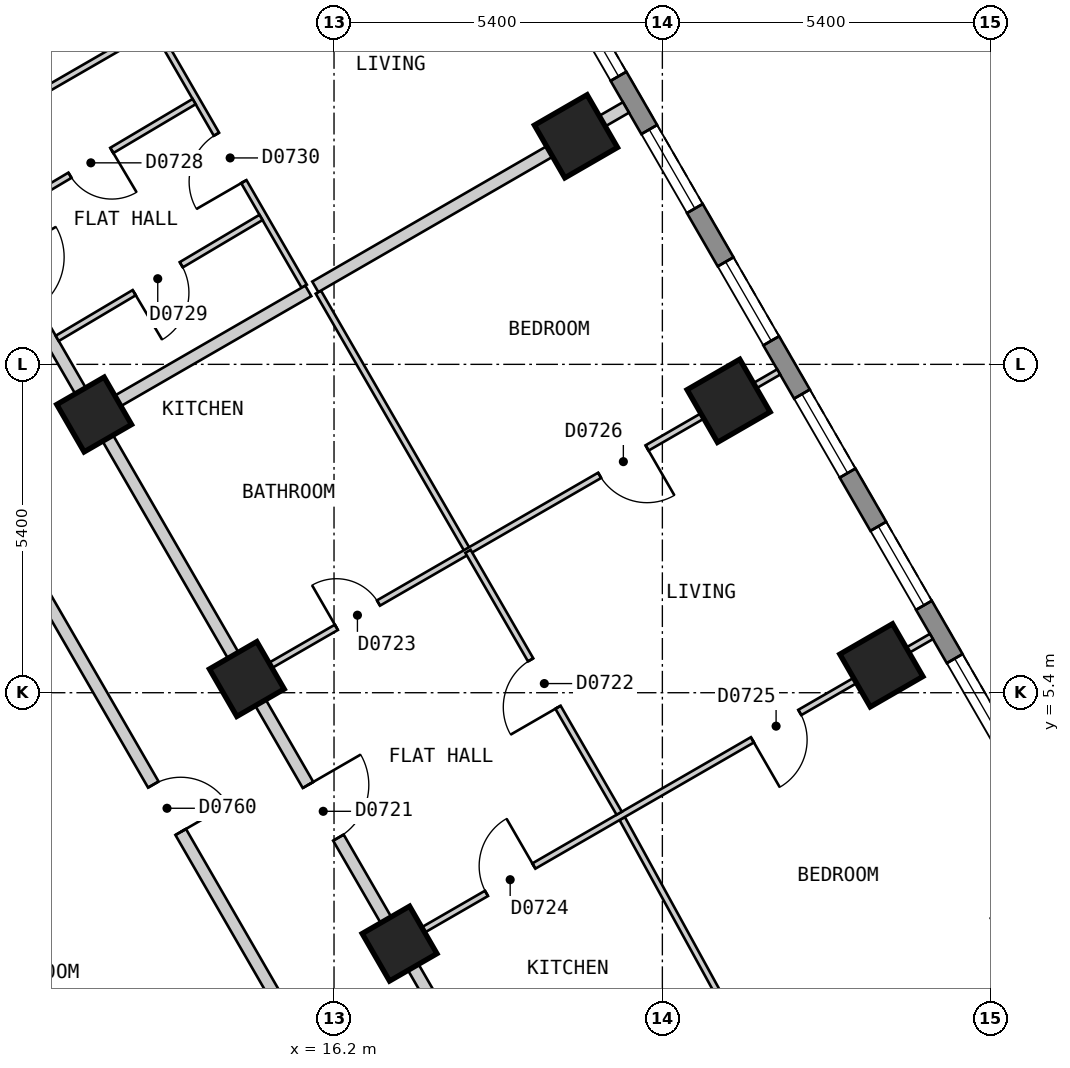
"""IFC4 building model, lengths in metres.
Left out: names, types, materials, properties, quantities, classifications, styles, units other than length and angle.
Written with IfcOpenShell. Run it as: python <this file> out.ifc"""

import sys

from ifc_helpers import new_model, si_unit, direction, frame, frame_2d, origin, origin_2d, place, context, subcontext, project, spatial, polyline, rectangle, outline, extrude, element, fill, save


model = new_model("IFC4")
c1 = context("Model", 3, precision=1e-05, world=origin(), true_north=direction((0.0, 1.0)))
c2 = subcontext(c1, "Body", "Model", "MODEL_VIEW")
j1 = project(units=[si_unit("LENGTHUNIT", "METRE"), si_unit("PLANEANGLEUNIT", "RADIAN")], contexts=[c1])
p1 = place(None, origin())
s1 = spatial("IfcSite", under=j1, at=p1, CompositionType="ELEMENT")
p2 = place(p1, origin())
s2 = spatial("IfcBuilding", under=s1, at=p2, CompositionType="ELEMENT")
p3 = place(p2, frame((0.0, 0.0, 99.0)))
s3 = spatial("IfcBuildingStorey", under=s2, at=p3, CompositionType="ELEMENT", Elevation=99.0)
for number, where, z_axis, x_axis in (
    (1, (25.202, 5.85, 0.0), (0.0, 0.0, 1.0), (-0.5, 0.866, 0.0)),
    (2, (22.69, 10.2, 0.0), (0.0, 0.0, 1.0), (-0.5, 0.866, 0.0)),
    (3, (20.179, 14.55, 0.0), (0.0, 0.0, 1.0), (-0.5, 0.866, 0.0)),
):
    element("IfcColumn", number, at=place(p3, frame(where, z_axis=z_axis, x_axis=x_axis)), inside=s3, PredefinedType="COLUMN", context=c2, shape_type="SweptSolid", body=[
        extrude(rectangle(XDim=1.0, YDim=1.0, at=origin_2d()), origin(), (0.0, 0.0, 1.0), 3.0),
    ])
for number, where, z_axis, x_axis in (
    (4, (17.278, 1.274, 0.0), (0.0, 0.0, 1.0), (-0.5, 0.866, 0.0)),
    (5, (14.766, 5.625, 0.0), (0.0, 0.0, 1.0), (-0.5, 0.866, 0.0)),
    (6, (12.255, 9.975, 0.0), (0.0, 0.0, 1.0), (-0.5, 0.866, 0.0)),
):
    element("IfcColumn", number, at=place(p3, frame(where, z_axis=z_axis, x_axis=x_axis)), inside=s3, PredefinedType="COLUMN", context=c2, shape_type="SweptSolid", body=[
        extrude(rectangle(XDim=0.9, YDim=0.9, at=origin_2d()), origin(), (0.0, 0.0, 1.0), 3.0),
    ])
p4 = place(p3, frame((29.027, 1.425, 0.0), z_axis=(0.0, 0.0, 1.0), x_axis=(-0.500027479704, 0.866009537788, 0.0)))
e7 = element("IfcWall", 7, at=p4, inside=s3, PredefinedType="SOLIDWALL", context=c2, shape_type="SweptSolid", body=[
    extrude(outline(polyline([(0.0, -0.15), (26.559, -0.15), (26.478, 0.15), (0.08, 0.15), (0.0, -0.15)])), origin(), (0.0, 0.0, 1.0), 2.7),
])
p5 = place(p4, frame((1.227, 0.0, 0.15)))
e8 = element("IfcOpeningElement", 8, at=p5, cuts=e7, PredefinedType="OPENING", context=c2, shape_type="SweptSolid", body=[
    extrude(rectangle(XDim=1.5, YDim=2.1, at=frame_2d((0.75, 1.05))), frame((0.0, 0.16, 0.0), z_axis=(0.0, -1.0, 0.0), x_axis=(1.0, 0.0, 0.0)), (0.0, 0.0, 1.0), 0.32),
])
p6 = place(p4, frame((3.738, 0.0, 0.15)))
e9 = element("IfcOpeningElement", 9, at=p6, cuts=e7, PredefinedType="OPENING", context=c2, shape_type="SweptSolid", body=[
    extrude(rectangle(XDim=1.5, YDim=2.1, at=frame_2d((0.75, 1.05))), frame((0.0, 0.16, 0.0), z_axis=(0.0, -1.0, 0.0), x_axis=(1.0, 0.0, 0.0)), (0.0, 0.0, 1.0), 0.32),
])
p7 = place(p4, frame((6.25, 0.0, 0.15)))
e10 = element("IfcOpeningElement", 10, at=p7, cuts=e7, PredefinedType="OPENING", context=c2, shape_type="SweptSolid", body=[
    extrude(rectangle(XDim=1.5, YDim=2.1, at=frame_2d((0.75, 1.05))), frame((0.0, 0.16, 0.0), z_axis=(0.0, -1.0, 0.0), x_axis=(1.0, 0.0, 0.0)), (0.0, 0.0, 1.0), 0.32),
])
p8 = place(p4, frame((8.761, 0.0, 0.15)))
e11 = element("IfcOpeningElement", 11, at=p8, cuts=e7, PredefinedType="OPENING", context=c2, shape_type="SweptSolid", body=[
    extrude(rectangle(XDim=1.5, YDim=2.1, at=frame_2d((0.75, 1.05))), frame((0.0, 0.16, 0.0), z_axis=(0.0, -1.0, 0.0), x_axis=(1.0, 0.0, 0.0)), (0.0, 0.0, 1.0), 0.32),
])
p9 = place(p4, frame((11.273, 0.0, 0.15)))
e12 = element("IfcOpeningElement", 12, at=p9, cuts=e7, PredefinedType="OPENING", context=c2, shape_type="SweptSolid", body=[
    extrude(rectangle(XDim=1.5, YDim=2.1, at=frame_2d((0.75, 1.05))), frame((0.0, 0.16, 0.0), z_axis=(0.0, -1.0, 0.0), x_axis=(1.0, 0.0, 0.0)), (0.0, 0.0, 1.0), 0.32),
])
p10 = place(p4, frame((13.785, 0.0, 0.15)))
e13 = element("IfcOpeningElement", 13, at=p10, cuts=e7, PredefinedType="OPENING", context=c2, shape_type="SweptSolid", body=[
    extrude(rectangle(XDim=1.5, YDim=2.1, at=frame_2d((0.75, 1.05))), frame((0.0, 0.16, 0.0), z_axis=(0.0, -1.0, 0.0), x_axis=(1.0, 0.0, 0.0)), (0.0, 0.0, 1.0), 0.32),
])
p11 = place(p4, frame((16.296, 0.0, 0.15)))
e14 = element("IfcOpeningElement", 14, at=p11, cuts=e7, PredefinedType="OPENING", context=c2, shape_type="SweptSolid", body=[
    extrude(rectangle(XDim=1.5, YDim=2.1, at=frame_2d((0.75, 1.05))), frame((0.0, 0.16, 0.0), z_axis=(0.0, -1.0, 0.0), x_axis=(1.0, 0.0, 0.0)), (0.0, 0.0, 1.0), 0.32),
])
p12 = place(p4, frame((18.807, 0.0, 0.15)))
e15 = element("IfcOpeningElement", 15, at=p12, cuts=e7, PredefinedType="OPENING", context=c2, shape_type="SweptSolid", body=[
    extrude(rectangle(XDim=1.5, YDim=2.1, at=frame_2d((0.75, 1.05))), frame((0.0, 0.16, 0.0), z_axis=(0.0, -1.0, 0.0), x_axis=(1.0, 0.0, 0.0)), (0.0, 0.0, 1.0), 0.32),
])
p13 = place(p4, frame((21.319, 0.0, 0.15)))
e16 = element("IfcOpeningElement", 16, at=p13, cuts=e7, PredefinedType="OPENING", context=c2, shape_type="SweptSolid", body=[
    extrude(rectangle(XDim=1.5, YDim=2.1, at=frame_2d((0.75, 1.05))), frame((0.0, 0.16, 0.0), z_axis=(0.0, -1.0, 0.0), x_axis=(1.0, 0.0, 0.0)), (0.0, 0.0, 1.0), 0.32),
])
p14 = place(p4, frame((23.831, 0.0, 0.15)))
e17 = element("IfcOpeningElement", 17, at=p14, cuts=e7, PredefinedType="OPENING", context=c2, shape_type="SweptSolid", body=[
    extrude(rectangle(XDim=1.5, YDim=2.1, at=frame_2d((0.75, 1.05))), frame((0.0, 0.16, 0.0), z_axis=(0.0, -1.0, 0.0), x_axis=(1.0, 0.0, 0.0)), (0.0, 0.0, 1.0), 0.32),
])
p15 = place(p3, frame((10.913, 7.899, 0.0), z_axis=(0.0, 0.0, 1.0), x_axis=(0.500028940566, -0.866008694296, 0.0)))
e18 = element("IfcWall", 18, at=p15, inside=s3, PredefinedType="PARTITIONING", context=c2, shape_type="SweptSolid", body=[
    extrude(rectangle(XDim=10.159, YDim=0.2, at=frame_2d((5.08, 0.0))), origin(), (0.0, 0.0, 1.0), 2.7),
])
p16 = place(p15, frame((4.63, 0.0, 0.0)))
e19 = element("IfcOpeningElement", 19, at=p16, cuts=e18, PredefinedType="OPENING", context=c2, shape_type="SweptSolid", body=[
    extrude(rectangle(XDim=0.9, YDim=2.1, at=frame_2d((0.45, 1.05))), frame((0.0, 0.11, 0.0), z_axis=(0.0, -1.0, 0.0), x_axis=(1.0, 0.0, 0.0)), (0.0, 0.0, 1.0), 0.22),
])
p17 = place(p3, frame((8.488, 16.5, 0.0), z_axis=(0.0, 0.0, 1.0), x_axis=(0.499986836607, -0.86603300354, 0.0)))
e20 = element("IfcWall", 20, at=p17, inside=s3, PredefinedType="PARTITIONING", context=c2, shape_type="SweptSolid", body=[
    extrude(rectangle(XDim=20.09, YDim=0.2, at=frame_2d((10.045, 0.0))), origin(), (0.0, 0.0, 1.0), 2.7),
])
p18 = place(p17, frame((14.569, 0.0, 0.0)))
e21 = element("IfcOpeningElement", 21, at=p18, cuts=e20, PredefinedType="OPENING", context=c2, shape_type="SweptSolid", body=[
    extrude(rectangle(XDim=1.0, YDim=2.1, at=frame_2d((0.5, 1.05))), frame((0.0, 0.11, 0.0), z_axis=(0.0, -1.0, 0.0), x_axis=(1.0, 0.0, 0.0)), (0.0, 0.0, 1.0), 0.22),
])
p19 = place(p17, frame((4.547, 0.0, 0.0)))
e22 = element("IfcOpeningElement", 22, at=p19, cuts=e20, PredefinedType="OPENING", context=c2, shape_type="SweptSolid", body=[
    extrude(rectangle(XDim=1.0, YDim=2.1, at=frame_2d((0.5, 1.05))), frame((0.0, 0.11, 0.0), z_axis=(0.0, -1.0, 0.0), x_axis=(1.0, 0.0, 0.0)), (0.0, 0.0, 1.0), 0.22),
])
p20 = place(p3, frame((13.273, 16.305, 0.0), z_axis=(0.0, 0.0, 1.0), x_axis=(0.500093956194, -0.865971151354, 0.0)))
e23 = element("IfcWall", 23, at=p20, inside=s3, PredefinedType="PARTITIONING", context=c2, shape_type="SweptSolid", body=[
    extrude(rectangle(XDim=4.873, YDim=0.1, at=frame_2d((2.437, 0.0))), origin(), (0.0, 0.0, 1.0), 2.7),
])
p21 = place(p20, frame((1.987, 0.0, 0.0)))
e24 = element("IfcOpeningElement", 24, at=p21, cuts=e23, PredefinedType="OPENING", context=c2, shape_type="SweptSolid", body=[
    extrude(rectangle(XDim=0.9, YDim=2.1, at=frame_2d((0.45, 1.05))), frame((0.0, 0.06, 0.0), z_axis=(0.0, -1.0, 0.0), x_axis=(1.0, 0.0, 0.0)), (0.0, 0.0, 1.0), 0.12),
])
p22 = place(p3, frame((15.942, 11.988, 0.0), z_axis=(0.0, 0.0, 1.0), x_axis=(0.499995794706, -0.866027831699, 0.0)))
e25 = element("IfcWall", 25, at=p22, inside=s3, PredefinedType="PARTITIONING", context=c2, shape_type="SweptSolid", body=[
    extrude(rectangle(XDim=4.922, YDim=0.1, at=frame_2d((2.461, 0.0))), origin(), (0.0, 0.0, 1.0), 2.7),
])
p23 = place(p3, frame((20.939, 3.331, 0.0), z_axis=(0.0, 0.0, 1.0), x_axis=(0.481207738216, -0.876606589458, 0.0)))
e26 = element("IfcWall", 26, at=p23, inside=s3, PredefinedType="PARTITIONING", context=c2, shape_type="SweptSolid", body=[
    extrude(rectangle(XDim=4.825, YDim=0.1, at=frame_2d((2.413, 0.0))), origin(), (0.0, 0.0, 1.0), 2.7),
])
p24 = place(p3, frame((17.365, 1.325, 0.0), z_axis=(0.0, 0.0, 1.0), x_axis=(0.866016855193, 0.500014806302, 0.0)))
e27 = element("IfcWall", 27, at=p24, inside=s3, PredefinedType="PARTITIONING", context=c2, shape_type="SweptSolid", body=[
    extrude(rectangle(XDim=10.0, YDim=0.1, at=frame_2d((5.0, 0.0))), origin(), (0.0, 0.0, 1.0), 2.7),
])
p25 = place(p24, frame((1.55, 0.0, 0.0)))
e28 = element("IfcOpeningElement", 28, at=p25, cuts=e27, PredefinedType="OPENING", context=c2, shape_type="SweptSolid", body=[
    extrude(rectangle(XDim=0.9, YDim=2.1, at=frame_2d((0.45, 1.05))), frame((0.0, 0.06, 0.0), z_axis=(0.0, -1.0, 0.0), x_axis=(1.0, 0.0, 0.0)), (0.0, 0.0, 1.0), 0.12),
])
p26 = place(p24, frame((6.6, 0.0, 0.0)))
e29 = element("IfcOpeningElement", 29, at=p26, cuts=e27, PredefinedType="OPENING", context=c2, shape_type="SweptSolid", body=[
    extrude(rectangle(XDim=0.9, YDim=2.1, at=frame_2d((0.45, 1.05))), frame((0.0, 0.06, 0.0), z_axis=(0.0, -1.0, 0.0), x_axis=(1.0, 0.0, 0.0)), (0.0, 0.0, 1.0), 0.12),
])
p27 = place(p3, frame((14.853, 5.675, 0.0), z_axis=(0.0, 0.0, 1.0), x_axis=(0.866016855193, 0.500014806302, 0.0)))
e30 = element("IfcWall", 30, at=p27, inside=s3, PredefinedType="PARTITIONING", context=c2, shape_type="SweptSolid", body=[
    extrude(rectangle(XDim=10.0, YDim=0.1, at=frame_2d((5.0, 0.0))), origin(), (0.0, 0.0, 1.0), 2.7),
])
p28 = place(p27, frame((1.6, 0.0, 0.0)))
e31 = element("IfcOpeningElement", 31, at=p28, cuts=e30, PredefinedType="OPENING", context=c2, shape_type="SweptSolid", body=[
    extrude(rectangle(XDim=0.8, YDim=2.1, at=frame_2d((0.4, 1.05))), frame((0.0, 0.06, 0.0), z_axis=(0.0, -1.0, 0.0), x_axis=(1.0, 0.0, 0.0)), (0.0, 0.0, 1.0), 0.12),
])
p29 = place(p27, frame((6.6, 0.0, 0.0)))
e32 = element("IfcOpeningElement", 32, at=p29, cuts=e30, PredefinedType="OPENING", context=c2, shape_type="SweptSolid", body=[
    extrude(rectangle(XDim=0.9, YDim=2.1, at=frame_2d((0.45, 1.05))), frame((0.0, 0.06, 0.0), z_axis=(0.0, -1.0, 0.0), x_axis=(1.0, 0.0, 0.0)), (0.0, 0.0, 1.0), 0.12),
])
p30 = place(p3, frame((9.83, 14.375, 0.0), z_axis=(0.0, 0.0, 1.0), x_axis=(0.866016855193, 0.500014806302, 0.0)))
e33 = element("IfcWall", 33, at=p30, inside=s3, PredefinedType="PARTITIONING", context=c2, shape_type="SweptSolid", body=[
    extrude(rectangle(XDim=10.0, YDim=0.1, at=frame_2d((5.0, 0.0))), origin(), (0.0, 0.0, 1.0), 2.7),
])
p31 = place(p30, frame((6.523, 0.0, 0.0)))
e34 = element("IfcOpeningElement", 34, at=p31, cuts=e33, PredefinedType="OPENING", context=c2, shape_type="SweptSolid", body=[
    extrude(rectangle(XDim=0.9, YDim=2.1, at=frame_2d((0.45, 1.05))), frame((0.0, 0.06, 0.0), z_axis=(0.0, -1.0, 0.0), x_axis=(1.0, 0.0, 0.0)), (0.0, 0.0, 1.0), 0.12),
])
p32 = place(p3, frame((11.647, 11.227, 0.0), z_axis=(0.0, 0.0, 1.0), x_axis=(0.859997349349, 0.510298500011, 0.0)))
e35 = element("IfcWall", 35, at=p32, inside=s3, PredefinedType="PARTITIONING", context=c2, shape_type="SweptSolid", body=[
    extrude(rectangle(XDim=3.898, YDim=0.1, at=frame_2d((1.949, 0.0))), origin(), (0.0, 0.0, 1.0), 2.7),
])
p33 = place(p32, frame((1.473, 0.0, 0.0)))
e36 = element("IfcOpeningElement", 36, at=p33, cuts=e35, PredefinedType="OPENING", context=c2, shape_type="SweptSolid", body=[
    extrude(rectangle(XDim=0.9, YDim=2.1, at=frame_2d((0.45, 1.05))), frame((0.0, 0.06, 0.0), z_axis=(0.0, -1.0, 0.0), x_axis=(1.0, 0.0, 0.0)), (0.0, 0.0, 1.0), 0.12),
])
p34 = place(p3, frame((10.547, 13.133, 0.0), z_axis=(0.0, 0.0, 1.0), x_axis=(0.860090994311, 0.510140648749, 0.0)))
e37 = element("IfcWall", 37, at=p34, inside=s3, PredefinedType="PARTITIONING", context=c2, shape_type="SweptSolid", body=[
    extrude(rectangle(XDim=3.897, YDim=0.1, at=frame_2d((1.948, 0.0))), origin(), (0.0, 0.0, 1.0), 2.7),
])
p35 = place(p34, frame((1.523, 0.0, 0.0)))
e38 = element("IfcOpeningElement", 38, at=p35, cuts=e37, PredefinedType="OPENING", context=c2, shape_type="SweptSolid", body=[
    extrude(rectangle(XDim=0.8, YDim=2.1, at=frame_2d((0.4, 1.05))), frame((0.0, 0.06, 0.0), z_axis=(0.0, -1.0, 0.0), x_axis=(1.0, 0.0, 0.0)), (0.0, 0.0, 1.0), 0.12),
])
p36 = place(p3, frame((12.342, 10.025, 0.0), z_axis=(0.0, 0.0, 1.0), x_axis=(0.866033886885, 0.499985306551, 0.0)))
e39 = element("IfcWall", 39, at=p36, inside=s3, PredefinedType="PARTITIONING", context=c2, shape_type="SweptSolid", body=[
    extrude(rectangle(XDim=3.966, YDim=0.2, at=frame_2d((1.983, 0.0))), origin(), (0.0, 0.0, 1.0), 2.7),
])
p37 = place(p3, frame((15.892, 12.075, 0.0), z_axis=(0.0, 0.0, 1.0), x_axis=(0.866000883696, 0.500042467634, 0.0)))
e40 = element("IfcWall", 40, at=p37, inside=s3, PredefinedType="PARTITIONING", context=c2, shape_type="SweptSolid", body=[
    extrude(rectangle(XDim=5.899, YDim=0.2, at=frame_2d((2.95, 0.0))), origin(), (0.0, 0.0, 1.0), 2.7),
])
p38 = place(p3, frame((18.403, 7.725, 0.0), z_axis=(0.0, 0.0, 1.0), x_axis=(0.500014231302, -0.866017187182, 0.0)))
e41 = element("IfcWall", 41, at=p38, inside=s3, PredefinedType="PARTITIONING", context=c2, shape_type="SweptSolid", body=[
    extrude(rectangle(XDim=4.973, YDim=0.1, at=frame_2d((2.487, 0.0))), origin(), (0.0, 0.0, 1.0), 2.7),
])
p39 = place(p38, frame((2.061, 0.0, 0.0)))
e42 = element("IfcOpeningElement", 42, at=p39, cuts=e41, PredefinedType="OPENING", context=c2, shape_type="SweptSolid", body=[
    extrude(rectangle(XDim=0.9, YDim=2.1, at=frame_2d((0.45, 1.05))), frame((0.0, 0.06, 0.0), z_axis=(0.0, -1.0, 0.0), x_axis=(1.0, 0.0, 0.0)), (0.0, 0.0, 1.0), 0.12),
])
p40 = place(p6, origin())
e43 = element("IfcWindow", 43, at=p40, inside=s3, PartitioningType="SINGLE_PANEL", PredefinedType="WINDOW", context=c2, shape_type="SweptSolid", body=[
    extrude(rectangle(XDim=1.5, YDim=2.1, at=frame_2d((0.75, 1.05))), frame((0.0, 0.03, 0.0), z_axis=(0.0, -1.0, 0.0), x_axis=(1.0, 0.0, 0.0)), (0.0, 0.0, 1.0), 0.06),
])
fill(e9, e43)
p41 = place(p7, origin())
e44 = element("IfcWindow", 44, at=p41, inside=s3, PartitioningType="SINGLE_PANEL", PredefinedType="WINDOW", context=c2, shape_type="SweptSolid", body=[
    extrude(rectangle(XDim=1.5, YDim=2.1, at=frame_2d((0.75, 1.05))), frame((0.0, 0.03, 0.0), z_axis=(0.0, -1.0, 0.0), x_axis=(1.0, 0.0, 0.0)), (0.0, 0.0, 1.0), 0.06),
])
fill(e10, e44)
p42 = place(p8, origin())
e45 = element("IfcWindow", 45, at=p42, inside=s3, PartitioningType="SINGLE_PANEL", PredefinedType="WINDOW", context=c2, shape_type="SweptSolid", body=[
    extrude(rectangle(XDim=1.5, YDim=2.1, at=frame_2d((0.75, 1.05))), frame((0.0, 0.03, 0.0), z_axis=(0.0, -1.0, 0.0), x_axis=(1.0, 0.0, 0.0)), (0.0, 0.0, 1.0), 0.06),
])
fill(e11, e45)
p43 = place(p9, origin())
e46 = element("IfcWindow", 46, at=p43, inside=s3, PartitioningType="SINGLE_PANEL", PredefinedType="WINDOW", context=c2, shape_type="SweptSolid", body=[
    extrude(rectangle(XDim=1.5, YDim=2.1, at=frame_2d((0.75, 1.05))), frame((0.0, 0.03, 0.0), z_axis=(0.0, -1.0, 0.0), x_axis=(1.0, 0.0, 0.0)), (0.0, 0.0, 1.0), 0.06),
])
fill(e12, e46)
p44 = place(p10, origin())
e47 = element("IfcWindow", 47, at=p44, inside=s3, PartitioningType="SINGLE_PANEL", PredefinedType="WINDOW", context=c2, shape_type="SweptSolid", body=[
    extrude(rectangle(XDim=1.5, YDim=2.1, at=frame_2d((0.75, 1.05))), frame((0.0, 0.03, 0.0), z_axis=(0.0, -1.0, 0.0), x_axis=(1.0, 0.0, 0.0)), (0.0, 0.0, 1.0), 0.06),
])
fill(e13, e47)
p45 = place(p11, origin())
e48 = element("IfcWindow", 48, at=p45, inside=s3, PartitioningType="SINGLE_PANEL", PredefinedType="WINDOW", context=c2, shape_type="SweptSolid", body=[
    extrude(rectangle(XDim=1.5, YDim=2.1, at=frame_2d((0.75, 1.05))), frame((0.0, 0.03, 0.0), z_axis=(0.0, -1.0, 0.0), x_axis=(1.0, 0.0, 0.0)), (0.0, 0.0, 1.0), 0.06),
])
fill(e14, e48)
p46 = place(p18, origin())
e49 = element("IfcDoor", 49, at=p46, inside=s3, OperationType="SINGLE_SWING_LEFT", PredefinedType="DOOR", context=c2, shape_type="SweptSolid", body=[
    extrude(rectangle(XDim=1.0, YDim=2.1, at=frame_2d((0.5, 1.05))), frame((0.0, 0.025, 0.0), z_axis=(0.0, -1.0, 0.0), x_axis=(1.0, 0.0, 0.0)), (0.0, 0.0, 1.0), 0.05),
])
fill(e21, e49)
p47 = place(p39, origin())
e50 = element("IfcDoor", 50, at=p47, inside=s3, OperationType="SINGLE_SWING_RIGHT", PredefinedType="DOOR", context=c2, shape_type="SweptSolid", body=[
    extrude(rectangle(XDim=0.9, YDim=2.1, at=frame_2d((0.45, 1.05))), frame((0.0, 0.025, 0.0), z_axis=(0.0, -1.0, 0.0), x_axis=(1.0, 0.0, 0.0)), (0.0, 0.0, 1.0), 0.05),
])
fill(e42, e50)
p48 = place(p28, origin())
e51 = element("IfcDoor", 51, at=p48, inside=s3, OperationType="SINGLE_SWING_LEFT", PredefinedType="DOOR", context=c2, shape_type="SweptSolid", body=[
    extrude(rectangle(XDim=0.8, YDim=2.1, at=frame_2d((0.4, 1.05))), frame((0.0, 0.025, 0.0), z_axis=(0.0, -1.0, 0.0), x_axis=(1.0, 0.0, 0.0)), (0.0, 0.0, 1.0), 0.05),
])
fill(e31, e51)
p49 = place(p25, origin())
e52 = element("IfcDoor", 52, at=p49, inside=s3, OperationType="SINGLE_SWING_RIGHT", PredefinedType="DOOR", context=c2, shape_type="SweptSolid", body=[
    extrude(rectangle(XDim=0.9, YDim=2.1, at=frame_2d((0.45, 1.05))), frame((0.0, 0.025, 0.0), z_axis=(0.0, -1.0, 0.0), x_axis=(1.0, 0.0, 0.0)), (0.0, 0.0, 1.0), 0.05),
])
fill(e28, e52)
p50 = place(p26, origin())
e53 = element("IfcDoor", 53, at=p50, inside=s3, OperationType="SINGLE_SWING_LEFT", PredefinedType="DOOR", context=c2, shape_type="SweptSolid", body=[
    extrude(rectangle(XDim=0.9, YDim=2.1, at=frame_2d((0.45, 1.05))), frame((0.0, 0.025, 0.0), z_axis=(0.0, -1.0, 0.0), x_axis=(1.0, 0.0, 0.0)), (0.0, 0.0, 1.0), 0.05),
])
fill(e29, e53)
p51 = place(p29, origin())
e54 = element("IfcDoor", 54, at=p51, inside=s3, OperationType="SINGLE_SWING_RIGHT", PredefinedType="DOOR", context=c2, shape_type="SweptSolid", body=[
    extrude(rectangle(XDim=0.9, YDim=2.1, at=frame_2d((0.45, 1.05))), frame((0.0, 0.025, 0.0), z_axis=(0.0, -1.0, 0.0), x_axis=(1.0, 0.0, 0.0)), (0.0, 0.0, 1.0), 0.05),
])
fill(e32, e54)
p52 = place(p35, origin())
e55 = element("IfcDoor", 55, at=p52, inside=s3, OperationType="SINGLE_SWING_RIGHT", PredefinedType="DOOR", context=c2, shape_type="SweptSolid", body=[
    extrude(rectangle(XDim=0.8, YDim=2.1, at=frame_2d((0.4, 1.05))), frame((0.0, 0.025, 0.0), z_axis=(0.0, -1.0, 0.0), x_axis=(1.0, 0.0, 0.0)), (0.0, 0.0, 1.0), 0.05),
])
fill(e38, e55)
p53 = place(p33, origin())
e56 = element("IfcDoor", 56, at=p53, inside=s3, OperationType="SINGLE_SWING_LEFT", PredefinedType="DOOR", context=c2, shape_type="SweptSolid", body=[
    extrude(rectangle(XDim=0.9, YDim=2.1, at=frame_2d((0.45, 1.05))), frame((0.0, 0.025, 0.0), z_axis=(0.0, -1.0, 0.0), x_axis=(1.0, 0.0, 0.0)), (0.0, 0.0, 1.0), 0.05),
])
fill(e36, e56)
p54 = place(p21, origin())
e57 = element("IfcDoor", 57, at=p54, inside=s3, OperationType="SINGLE_SWING_RIGHT", PredefinedType="DOOR", context=c2, shape_type="SweptSolid", body=[
    extrude(rectangle(XDim=0.9, YDim=2.1, at=frame_2d((0.45, 1.05))), frame((0.0, 0.025, 0.0), z_axis=(0.0, -1.0, 0.0), x_axis=(1.0, 0.0, 0.0)), (0.0, 0.0, 1.0), 0.05),
])
fill(e24, e57)
p55 = place(p16, origin())
e58 = element("IfcDoor", 58, at=p55, inside=s3, OperationType="SINGLE_SWING_RIGHT", PredefinedType="DOOR", context=c2, shape_type="SweptSolid", body=[
    extrude(rectangle(XDim=0.9, YDim=2.1, at=frame_2d((0.45, 1.05))), frame((0.0, 0.025, 0.0), z_axis=(0.0, -1.0, 0.0), x_axis=(1.0, 0.0, 0.0)), (0.0, 0.0, 1.0), 0.05),
])
fill(e19, e58)
save(model, sys.argv[1])
